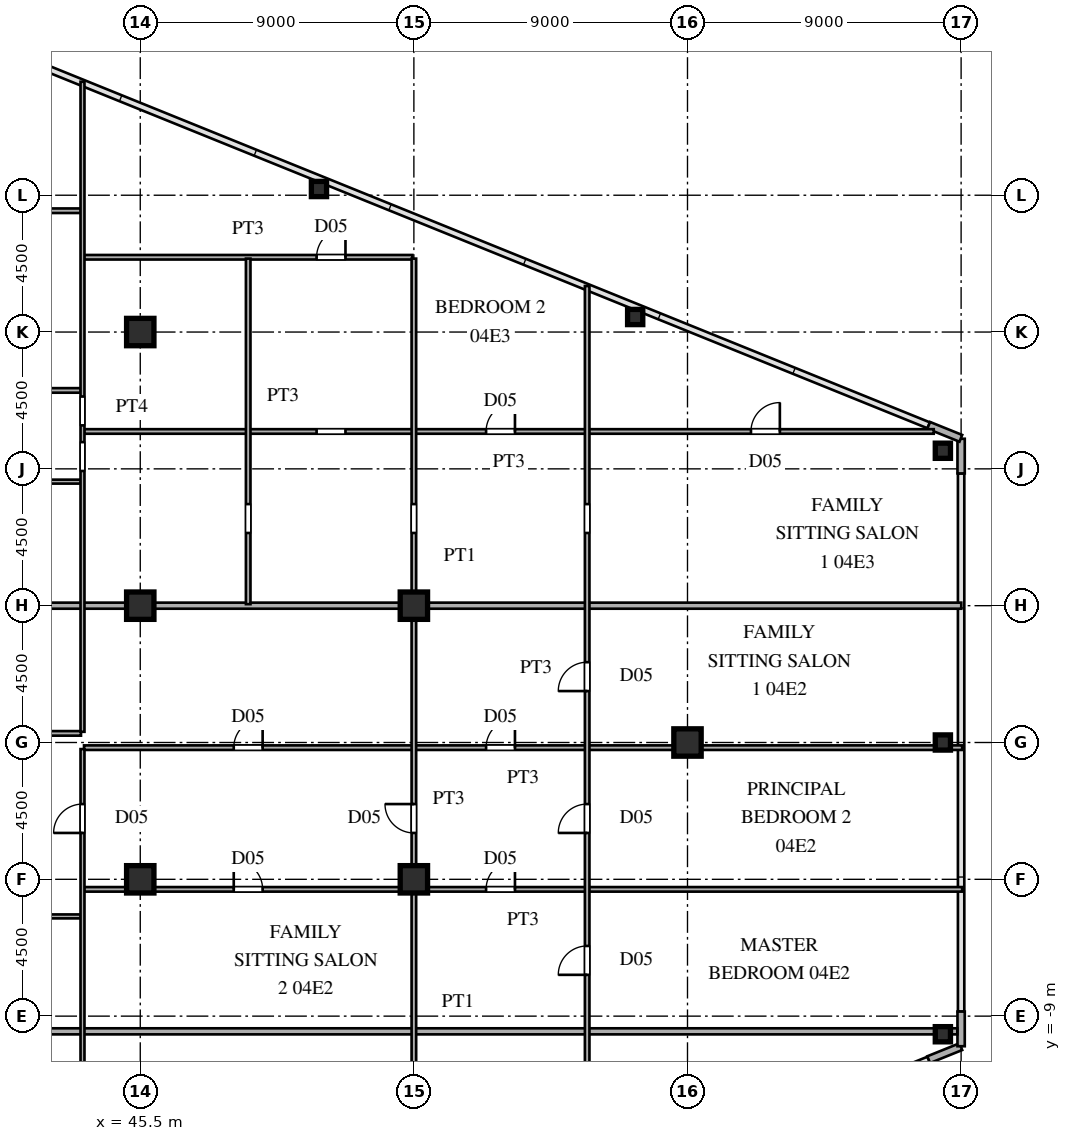
"""IFC4 building model, lengths in metres.
Left out: names, types, materials, properties, quantities, classifications, styles, units other than length and angle.
Written with IfcOpenShell. Run it as: python <this file> out.ifc"""

import sys

from ifc_helpers import new_model, si_unit, direction, frame, frame_2d, origin, origin_2d, place, context, subcontext, project, spatial, rectangle, hollow_rectangle, i_section, extrude, source, transform, mapped, element, fill, save


model = new_model("IFC4")
c1 = context("Model", 3, precision=1e-05, world=origin(), true_north=direction((0.0, 1.0)))
c2 = subcontext(c1, "Body", "Model", "MODEL_VIEW")
j1 = project(units=[si_unit("LENGTHUNIT", "METRE"), si_unit("PLANEANGLEUNIT", "RADIAN")], contexts=[c1])
p1 = place(None, origin())
s1 = spatial("IfcSite", under=j1, at=p1, CompositionType="ELEMENT")
p2 = place(p1, origin())
s2 = spatial("IfcBuilding", under=s1, at=p2, CompositionType="ELEMENT")
p3 = place(p2, frame((0.0, 0.0, 18.9)))
s3 = spatial("IfcBuildingStorey", under=s2, at=p3, CompositionType="ELEMENT", Elevation=18.9)
m1 = source(origin(), c2, "Body", "SweptSolid", [
    extrude(i_section(OverallWidth=0.9, OverallDepth=0.9, WebThickness=0.036, FlangeThickness=0.055, at=origin_2d()), origin(), (0.0, 0.0, 1.0), 3.6),
])
for number, where, z_axis, x_axis in (
    (1, (45.5, -4.5, 0.0), (0.0, 0.0, 1.0), (1.0, 0.0, 0.0)),
    (2, (45.5, 4.5, 0.0), (0.0, 0.0, 1.0), (1.0, 0.0, 0.0)),
    (3, (45.5, 13.5, 0.0), (0.0, 0.0, 1.0), (1.0, 0.0, 0.0)),
    (4, (54.5, -4.5, 0.0), (0.0, 0.0, 1.0), (1.0, 0.0, 0.0)),
    (5, (54.5, 4.5, 0.0), (0.0, 0.0, 1.0), (1.0, 0.0, 0.0)),
    (6, (63.5, 0.0, 0.0), (0.0, 0.0, 1.0), (1.0, 0.0, 0.0)),
):
    element("IfcColumn", number, at=place(p3, frame(where, z_axis=z_axis, x_axis=x_axis)), inside=s3, PredefinedType="COLUMN", context=c2, shape_type="MappedRepresentation", body=[
        mapped(m1, transform((0.0, 0.0, 0.0), scale=1.0)),
    ])
m2 = source(origin(), c2, "Body", "SweptSolid", [
    extrude(hollow_rectangle(XDim=0.5, YDim=0.5, WallThickness=0.02, at=origin_2d()), origin(), (0.0, 0.0, 1.0), 3.6),
])
for number, where, z_axis, x_axis in (
    (7, (71.9, -9.596, 0.0), (0.0, 0.0, 1.0), (1.0, 0.0, 0.0)),
    (8, (71.9, 9.596, 0.0), (0.0, 0.0, 1.0), (1.0, 0.0, 0.0)),
    (9, (51.378, 18.204, 0.0), (0.0, 0.0, 1.0), (1.0, 0.0, 0.0)),
    (10, (61.779, 13.994, 0.0), (0.0, 0.0, 1.0), (1.0, 0.0, 0.0)),
    (11, (71.9, 0.0, 0.0), (0.0, 0.0, 1.0), (1.0, 0.0, 0.0)),
):
    element("IfcColumn", number, at=place(p3, frame(where, z_axis=z_axis, x_axis=x_axis)), inside=s3, PredefinedType="COLUMN", context=c2, shape_type="MappedRepresentation", body=[
        mapped(m2, transform((0.0, 0.0, 0.0), scale=1.0)),
    ])
for number, where, z_axis, x_axis in (
    (12, (71.434, -10.431, 0.0), (0.0, 0.0, 1.0), (0.927, 0.375, 0.0)),
    (13, (72.5, -9.99, 0.0), (0.0, 0.0, 1.0), (0.0, 1.0, 0.0)),
    (14, (72.5, 8.85, 0.0), (0.0, 0.0, 1.0), (0.0, 1.0, 0.0)),
    (15, (72.491, 10.004, 0.0), (0.0, 0.0, 1.0), (-0.927, 0.375, 0.0)),
):
    element("IfcWall", number, at=place(p3, frame(where, z_axis=z_axis, x_axis=x_axis)), inside=s3, PredefinedType="SOLIDWALL", context=c2, shape_type="SweptSolid", body=[
        extrude(rectangle(XDim=1.14, YDim=0.24, at=frame_2d((0.57, 0.0))), origin(), (0.0, 0.0, 1.0), 3.38),
    ])
p4 = place(p3, frame((39.53, -9.5, 0.0), z_axis=(0.0, 0.0, 1.0), x_axis=(1.0, 0.0, 0.0)))
e16 = element("IfcWall", 16, at=p4, inside=s3, PredefinedType="PARTITIONING", context=c2, shape_type="SweptSolid", body=[
    extrude(rectangle(XDim=32.845, YDim=0.2, at=frame_2d((16.422, 0.0))), origin(), (0.0, 0.0, 1.0), 3.38),
])
p5 = place(p3, frame((39.5, -5.72, 0.0), z_axis=(0.0, 0.0, 1.0), x_axis=(1.0, 0.0, 0.0)))
e17 = element("IfcWall", 17, at=p5, inside=s3, PredefinedType="PARTITIONING", context=c2, shape_type="SweptSolid", body=[
    extrude(rectangle(XDim=4.05, YDim=0.13, at=frame_2d((2.025, 0.0))), origin(), (0.0, 0.0, 1.0), 3.38),
])
p6 = place(p5, frame((1.585, 0.0, 0.0)))
e18 = element("IfcOpeningElement", 18, at=p6, cuts=e17, PredefinedType="OPENING", context=c2, shape_type="SweptSolid", body=[
    extrude(rectangle(XDim=0.88, YDim=2.1, at=frame_2d((0.44, 1.05))), frame((0.0, 0.075, 0.0), z_axis=(0.0, -1.0, 0.0), x_axis=(1.0, 0.0, 0.0)), (0.0, 0.0, 1.0), 0.15),
])
p7 = place(p3, frame((43.65, -4.83, 0.0), z_axis=(0.0, 0.0, 1.0), x_axis=(1.0, 0.0, 0.0)))
e19 = element("IfcWall", 19, at=p7, inside=s3, PredefinedType="PARTITIONING", context=c2, shape_type="SweptSolid", body=[
    extrude(rectangle(XDim=28.885, YDim=0.15, at=frame_2d((14.442, 0.0))), origin(), (0.0, 0.0, 1.0), 3.38),
])
p8 = place(p7, frame((4.925, 0.0, 0.0)))
e20 = element("IfcOpeningElement", 20, at=p8, cuts=e19, PredefinedType="OPENING", context=c2, shape_type="SweptSolid", body=[
    extrude(rectangle(XDim=0.95, YDim=2.15, at=frame_2d((0.475, 1.075))), frame((0.0, 0.085, 0.0), z_axis=(0.0, -1.0, 0.0), x_axis=(1.0, 0.0, 0.0)), (0.0, 0.0, 1.0), 0.17),
])
p9 = place(p7, frame((13.225, 0.0, 0.0)))
e21 = element("IfcOpeningElement", 21, at=p9, cuts=e19, PredefinedType="OPENING", context=c2, shape_type="SweptSolid", body=[
    extrude(rectangle(XDim=0.95, YDim=2.15, at=frame_2d((0.475, 1.075))), frame((0.0, 0.085, 0.0), z_axis=(0.0, -1.0, 0.0), x_axis=(1.0, 0.0, 0.0)), (0.0, 0.0, 1.0), 0.17),
])
p10 = place(p3, frame((43.65, -0.17, 0.0), z_axis=(0.0, 0.0, 1.0), x_axis=(1.0, 0.0, 0.0)))
e22 = element("IfcWall", 22, at=p10, inside=s3, PredefinedType="PARTITIONING", context=c2, shape_type="SweptSolid", body=[
    extrude(rectangle(XDim=28.885, YDim=0.15, at=frame_2d((14.442, 0.0))), origin(), (0.0, 0.0, 1.0), 3.38),
])
p11 = place(p10, frame((4.925, 0.0, 0.0)))
e23 = element("IfcOpeningElement", 23, at=p11, cuts=e22, PredefinedType="OPENING", context=c2, shape_type="SweptSolid", body=[
    extrude(rectangle(XDim=0.95, YDim=2.15, at=frame_2d((0.475, 1.075))), frame((0.0, 0.085, 0.0), z_axis=(0.0, -1.0, 0.0), x_axis=(1.0, 0.0, 0.0)), (0.0, 0.0, 1.0), 0.17),
])
p12 = place(p10, frame((13.225, 0.0, 0.0)))
e24 = element("IfcOpeningElement", 24, at=p12, cuts=e22, PredefinedType="OPENING", context=c2, shape_type="SweptSolid", body=[
    extrude(rectangle(XDim=0.95, YDim=2.15, at=frame_2d((0.475, 1.075))), frame((0.0, 0.085, 0.0), z_axis=(0.0, -1.0, 0.0), x_axis=(1.0, 0.0, 0.0)), (0.0, 0.0, 1.0), 0.17),
])
p13 = place(p3, frame((39.5, 0.3, 0.0), z_axis=(0.0, 0.0, 1.0), x_axis=(1.0, 0.0, 0.0)))
e25 = element("IfcWall", 25, at=p13, inside=s3, PredefinedType="PARTITIONING", context=c2, shape_type="SweptSolid", body=[
    extrude(rectangle(XDim=4.05, YDim=0.15, at=frame_2d((2.025, 0.0))), origin(), (0.0, 0.0, 1.0), 3.38),
])
p14 = place(p13, frame((1.55, 0.0, 0.0)))
e26 = element("IfcOpeningElement", 26, at=p14, cuts=e25, PredefinedType="OPENING", context=c2, shape_type="SweptSolid", body=[
    extrude(rectangle(XDim=0.95, YDim=2.15, at=frame_2d((0.475, 1.075))), frame((0.0, 0.085, 0.0), z_axis=(0.0, -1.0, 0.0), x_axis=(1.0, 0.0, 0.0)), (0.0, 0.0, 1.0), 0.17),
])
p15 = place(p3, frame((39.53, 4.5, 0.0), z_axis=(0.0, 0.0, 1.0), x_axis=(1.0, 0.0, 0.0)))
e27 = element("IfcWall", 27, at=p15, inside=s3, PredefinedType="PARTITIONING", context=c2, shape_type="SweptSolid", body=[
    extrude(rectangle(XDim=14.99, YDim=0.2, at=frame_2d((7.495, 0.0))), origin(), (0.0, 0.0, 1.0), 2.68),
])
p16 = place(p3, frame((54.52, 4.5, 0.0), z_axis=(0.0, 0.0, 1.0), x_axis=(1.0, 0.0, 0.0)))
e28 = element("IfcWall", 28, at=p16, inside=s3, PredefinedType="PARTITIONING", context=c2, shape_type="SweptSolid", body=[
    extrude(rectangle(XDim=17.985, YDim=0.2, at=frame_2d((8.992, 0.0))), origin(), (0.0, 0.0, 1.0), 3.38),
])
p17 = place(p3, frame((39.5, 8.58, 0.0), z_axis=(0.0, 0.0, 1.0), x_axis=(1.0, 0.0, 0.0)))
e29 = element("IfcWall", 29, at=p17, inside=s3, PredefinedType="PARTITIONING", context=c2, shape_type="SweptSolid", body=[
    extrude(rectangle(XDim=4.05, YDim=0.13, at=frame_2d((2.025, 0.0))), origin(), (0.0, 0.0, 1.0), 3.38),
])
p18 = place(p17, frame((1.585, 0.0, 0.0)))
e30 = element("IfcOpeningElement", 30, at=p18, cuts=e29, PredefinedType="OPENING", context=c2, shape_type="SweptSolid", body=[
    extrude(rectangle(XDim=0.88, YDim=2.1, at=frame_2d((0.44, 1.05))), frame((0.0, 0.075, 0.0), z_axis=(0.0, -1.0, 0.0), x_axis=(1.0, 0.0, 0.0)), (0.0, 0.0, 1.0), 0.15),
])
p19 = place(p3, frame((43.65, 10.23, 0.0), z_axis=(0.0, 0.0, 1.0), x_axis=(1.0, 0.0, 0.0)))
e31 = element("IfcWall", 31, at=p19, inside=s3, PredefinedType="PARTITIONING", context=c2, shape_type="SweptSolid", body=[
    extrude(rectangle(XDim=27.949, YDim=0.15, at=frame_2d((13.974, 0.0))), origin(), (0.0, 0.0, 1.0), 3.38),
])
p20 = place(p19, frame((21.938, 0.0, 0.0)))
e32 = element("IfcOpeningElement", 32, at=p20, cuts=e31, PredefinedType="OPENING", context=c2, shape_type="SweptSolid", body=[
    extrude(rectangle(XDim=0.95, YDim=2.15, at=frame_2d((0.475, 1.075))), frame((0.0, 0.085, 0.0), z_axis=(0.0, -1.0, 0.0), x_axis=(1.0, 0.0, 0.0)), (0.0, 0.0, 1.0), 0.17),
])
p21 = place(p19, frame((13.225, 0.0, 0.0)))
e33 = element("IfcOpeningElement", 33, at=p21, cuts=e31, PredefinedType="OPENING", context=c2, shape_type="SweptSolid", body=[
    extrude(rectangle(XDim=0.95, YDim=2.15, at=frame_2d((0.475, 1.075))), frame((0.0, 0.085, 0.0), z_axis=(0.0, -1.0, 0.0), x_axis=(1.0, 0.0, 0.0)), (0.0, 0.0, 1.0), 0.17),
])
p22 = place(p19, frame((7.65, 0.0, 0.0)))
e34 = element("IfcOpeningElement", 34, at=p22, cuts=e31, PredefinedType="OPENING", context=c2, shape_type="SweptSolid", body=[
    extrude(rectangle(XDim=0.95, YDim=2.15, at=frame_2d((0.475, 1.075))), frame((0.0, 0.085, 0.0), z_axis=(0.0, -1.0, 0.0), x_axis=(1.0, 0.0, 0.0)), (0.0, 0.0, 1.0), 0.17),
])
p23 = place(p3, frame((39.5, 11.58, 0.0), z_axis=(0.0, 0.0, 1.0), x_axis=(1.0, 0.0, 0.0)))
e35 = element("IfcWall", 35, at=p23, inside=s3, PredefinedType="PARTITIONING", context=c2, shape_type="SweptSolid", body=[
    extrude(rectangle(XDim=4.05, YDim=0.15, at=frame_2d((2.025, 0.0))), origin(), (0.0, 0.0, 1.0), 3.38),
])
p24 = place(p23, frame((1.55, 0.0, 0.0)))
e36 = element("IfcOpeningElement", 36, at=p24, cuts=e35, PredefinedType="OPENING", context=c2, shape_type="SweptSolid", body=[
    extrude(rectangle(XDim=0.95, YDim=2.15, at=frame_2d((0.475, 1.075))), frame((0.0, 0.085, 0.0), z_axis=(0.0, -1.0, 0.0), x_axis=(1.0, 0.0, 0.0)), (0.0, 0.0, 1.0), 0.17),
])
p25 = place(p3, frame((43.65, 15.96, 0.0), z_axis=(0.0, 0.0, 1.0), x_axis=(1.0, 0.0, 0.0)))
e37 = element("IfcWall", 37, at=p25, inside=s3, PredefinedType="PARTITIONING", context=c2, shape_type="SweptSolid", body=[
    extrude(rectangle(XDim=10.8, YDim=0.15, at=frame_2d((5.4, 0.0))), origin(), (0.0, 0.0, 1.0), 3.38),
])
p26 = place(p25, frame((7.65, 0.0, 0.0)))
e38 = element("IfcOpeningElement", 38, at=p26, cuts=e37, PredefinedType="OPENING", context=c2, shape_type="SweptSolid", body=[
    extrude(rectangle(XDim=0.95, YDim=2.15, at=frame_2d((0.475, 1.075))), frame((0.0, 0.085, 0.0), z_axis=(0.0, -1.0, 0.0), x_axis=(1.0, 0.0, 0.0)), (0.0, 0.0, 1.0), 0.17),
])
p27 = place(p3, frame((39.45, 17.49, 0.0), z_axis=(0.0, 0.0, 1.0), x_axis=(1.0, 0.0, 0.0)))
e39 = element("IfcWall", 39, at=p27, inside=s3, PredefinedType="PARTITIONING", context=c2, shape_type="SweptSolid", body=[
    extrude(rectangle(XDim=4.1, YDim=0.15, at=frame_2d((2.05, 0.0))), origin(), (0.0, 0.0, 1.0), 3.38),
])
p28 = place(p3, frame((43.6, -21.733, 0.0), z_axis=(0.0, 0.0, 1.0), x_axis=(0.0, 1.0, 0.0)))
e40 = element("IfcWall", 40, at=p28, inside=s3, PredefinedType="PARTITIONING", context=c2, shape_type="SweptSolid", body=[
    extrude(rectangle(XDim=21.516, YDim=0.13, at=frame_2d((10.758, 0.0))), origin(), (0.0, 0.0, 1.0), 3.38),
])
p29 = place(p28, frame((6.903, 0.0, 0.0)))
e41 = element("IfcOpeningElement", 41, at=p29, cuts=e40, PredefinedType="OPENING", context=c2, shape_type="SweptSolid", body=[
    extrude(rectangle(XDim=0.95, YDim=2.15, at=frame_2d((0.475, 1.075))), frame((0.0, 0.075, 0.0), z_axis=(0.0, -1.0, 0.0), x_axis=(1.0, 0.0, 0.0)), (0.0, 0.0, 1.0), 0.15),
])
p30 = place(p28, frame((8.403, 0.0, 0.0)))
e42 = element("IfcOpeningElement", 42, at=p30, cuts=e40, PredefinedType="OPENING", context=c2, shape_type="SweptSolid", body=[
    extrude(rectangle(XDim=0.95, YDim=2.15, at=frame_2d((0.475, 1.075))), frame((0.0, 0.075, 0.0), z_axis=(0.0, -1.0, 0.0), x_axis=(1.0, 0.0, 0.0)), (0.0, 0.0, 1.0), 0.15),
])
p31 = place(p28, frame((18.758, 0.0, 0.0)))
e43 = element("IfcOpeningElement", 43, at=p31, cuts=e40, PredefinedType="OPENING", context=c2, shape_type="SweptSolid", body=[
    extrude(rectangle(XDim=0.95, YDim=2.15, at=frame_2d((0.475, 1.075))), frame((0.0, 0.075, 0.0), z_axis=(0.0, -1.0, 0.0), x_axis=(1.0, 0.0, 0.0)), (0.0, 0.0, 1.0), 0.15),
])
p32 = place(p3, frame((43.6, 0.352, 0.0), z_axis=(0.0, 0.0, 1.0), x_axis=(0.0, 1.0, 0.0)))
e44 = element("IfcWall", 44, at=p32, inside=s3, PredefinedType="PARTITIONING", context=c2, shape_type="SweptSolid", body=[
    extrude(rectangle(XDim=21.381, YDim=0.13, at=frame_2d((10.69, 0.0))), origin(), (0.0, 0.0, 1.0), 3.38),
])
p33 = place(p32, frame((8.578, 0.0, 0.0)))
e45 = element("IfcOpeningElement", 45, at=p33, cuts=e44, PredefinedType="OPENING", context=c2, shape_type="SweptSolid", body=[
    extrude(rectangle(XDim=0.95, YDim=2.15, at=frame_2d((0.475, 1.075))), frame((0.0, 0.075, 0.0), z_axis=(0.0, -1.0, 0.0), x_axis=(1.0, 0.0, 0.0)), (0.0, 0.0, 1.0), 0.15),
])
p34 = place(p32, frame((10.078, 0.0, 0.0)))
e46 = element("IfcOpeningElement", 46, at=p34, cuts=e44, PredefinedType="OPENING", context=c2, shape_type="SweptSolid", body=[
    extrude(rectangle(XDim=0.95, YDim=2.15, at=frame_2d((0.475, 1.075))), frame((0.0, 0.075, 0.0), z_axis=(0.0, -1.0, 0.0), x_axis=(1.0, 0.0, 0.0)), (0.0, 0.0, 1.0), 0.15),
])
p35 = place(p3, frame((49.05, 4.55, 0.0), z_axis=(0.0, 0.0, 1.0), x_axis=(0.0, 1.0, 0.0)))
e47 = element("IfcWall", 47, at=p35, inside=s3, PredefinedType="PARTITIONING", context=c2, shape_type="SweptSolid", body=[
    extrude(rectangle(XDim=11.365, YDim=0.15, at=frame_2d((5.683, 0.0))), origin(), (0.0, 0.0, 1.0), 3.38),
])
p36 = place(p35, frame((2.341, 0.0, 0.0)))
e48 = element("IfcOpeningElement", 48, at=p36, cuts=e47, PredefinedType="OPENING", context=c2, shape_type="SweptSolid", body=[
    extrude(rectangle(XDim=0.95, YDim=2.15, at=frame_2d((0.475, 1.075))), frame((0.0, 0.085, 0.0), z_axis=(0.0, -1.0, 0.0), x_axis=(1.0, 0.0, 0.0)), (0.0, 0.0, 1.0), 0.17),
])
p37 = place(p3, frame((54.5, -17.321, 0.0), z_axis=(0.0, 0.0, 1.0), x_axis=(0.0, 1.0, 0.0)))
e49 = element("IfcWall", 49, at=p37, inside=s3, PredefinedType="PARTITIONING", context=c2, shape_type="SweptSolid", body=[
    extrude(rectangle(XDim=33.236, YDim=0.15, at=frame_2d((16.618, 0.0))), origin(), (0.0, 0.0, 1.0), 2.68),
])
p38 = place(p37, frame((1.42, 0.0, 0.0)))
e50 = element("IfcOpeningElement", 50, at=p38, cuts=e49, PredefinedType="OPENING", context=c2, shape_type="SweptSolid", body=[
    extrude(rectangle(XDim=0.95, YDim=2.15, at=frame_2d((0.475, 1.075))), frame((0.0, 0.085, 0.0), z_axis=(0.0, -1.0, 0.0), x_axis=(1.0, 0.0, 0.0)), (0.0, 0.0, 1.0), 0.17),
])
p39 = place(p37, frame((5.313, 0.0, 0.0)))
e51 = element("IfcOpeningElement", 51, at=p39, cuts=e49, PredefinedType="OPENING", context=c2, shape_type="SweptSolid", body=[
    extrude(rectangle(XDim=0.95, YDim=2.15, at=frame_2d((0.475, 1.075))), frame((0.0, 0.085, 0.0), z_axis=(0.0, -1.0, 0.0), x_axis=(1.0, 0.0, 0.0)), (0.0, 0.0, 1.0), 0.17),
])
p40 = place(p37, frame((14.346, 0.0, 0.0)))
e52 = element("IfcOpeningElement", 52, at=p40, cuts=e49, PredefinedType="OPENING", context=c2, shape_type="SweptSolid", body=[
    extrude(rectangle(XDim=0.95, YDim=2.15, at=frame_2d((0.475, 1.075))), frame((0.0, 0.085, 0.0), z_axis=(0.0, -1.0, 0.0), x_axis=(1.0, 0.0, 0.0)), (0.0, 0.0, 1.0), 0.17),
])
p41 = place(p37, frame((24.212, 0.0, 0.0)))
e53 = element("IfcOpeningElement", 53, at=p41, cuts=e49, PredefinedType="OPENING", context=c2, shape_type="SweptSolid", body=[
    extrude(rectangle(XDim=0.95, YDim=2.15, at=frame_2d((0.475, 1.075))), frame((0.0, 0.085, 0.0), z_axis=(0.0, -1.0, 0.0), x_axis=(1.0, 0.0, 0.0)), (0.0, 0.0, 1.0), 0.17),
])
p42 = place(p3, frame((60.2, -13.516, 0.0), z_axis=(0.0, 0.0, 1.0), x_axis=(0.0, 1.0, 0.0)))
e54 = element("IfcWall", 54, at=p42, inside=s3, PredefinedType="PARTITIONING", context=c2, shape_type="SweptSolid", body=[
    extrude(rectangle(XDim=28.53, YDim=0.15, at=frame_2d((14.265, 0.0))), origin(), (0.0, 0.0, 1.0), 3.38),
])
p43 = place(p42, frame((1.508, 0.0, 0.0)))
e55 = element("IfcOpeningElement", 55, at=p43, cuts=e54, PredefinedType="OPENING", context=c2, shape_type="SweptSolid", body=[
    extrude(rectangle(XDim=0.95, YDim=2.15, at=frame_2d((0.475, 1.075))), frame((0.0, 0.085, 0.0), z_axis=(0.0, -1.0, 0.0), x_axis=(1.0, 0.0, 0.0)), (0.0, 0.0, 1.0), 0.17),
])
p44 = place(p42, frame((5.875, 0.0, 0.0)))
e56 = element("IfcOpeningElement", 56, at=p44, cuts=e54, PredefinedType="OPENING", context=c2, shape_type="SweptSolid", body=[
    extrude(rectangle(XDim=0.95, YDim=2.15, at=frame_2d((0.475, 1.075))), frame((0.0, 0.085, 0.0), z_axis=(0.0, -1.0, 0.0), x_axis=(1.0, 0.0, 0.0)), (0.0, 0.0, 1.0), 0.17),
])
p45 = place(p42, frame((10.541, 0.0, 0.0)))
e57 = element("IfcOpeningElement", 57, at=p45, cuts=e54, PredefinedType="OPENING", context=c2, shape_type="SweptSolid", body=[
    extrude(rectangle(XDim=0.95, YDim=2.15, at=frame_2d((0.475, 1.075))), frame((0.0, 0.085, 0.0), z_axis=(0.0, -1.0, 0.0), x_axis=(1.0, 0.0, 0.0)), (0.0, 0.0, 1.0), 0.17),
])
p46 = place(p42, frame((15.208, 0.0, 0.0)))
e58 = element("IfcOpeningElement", 58, at=p46, cuts=e54, PredefinedType="OPENING", context=c2, shape_type="SweptSolid", body=[
    extrude(rectangle(XDim=0.95, YDim=2.15, at=frame_2d((0.475, 1.075))), frame((0.0, 0.085, 0.0), z_axis=(0.0, -1.0, 0.0), x_axis=(1.0, 0.0, 0.0)), (0.0, 0.0, 1.0), 0.17),
])
p47 = place(p42, frame((20.407, 0.0, 0.0)))
e59 = element("IfcOpeningElement", 59, at=p47, cuts=e54, PredefinedType="OPENING", context=c2, shape_type="SweptSolid", body=[
    extrude(rectangle(XDim=0.95, YDim=2.15, at=frame_2d((0.475, 1.075))), frame((0.0, 0.085, 0.0), z_axis=(0.0, -1.0, 0.0), x_axis=(1.0, 0.0, 0.0)), (0.0, 0.0, 1.0), 0.17),
])
m3 = source(origin(), c2, "Body", "SweptSolid", [
    extrude(rectangle(XDim=0.95, YDim=2.15, at=frame_2d((0.475, 1.075))), frame((0.0, 0.025, 0.0), z_axis=(0.0, -1.0, 0.0), x_axis=(1.0, 0.0, 0.0)), (0.0, 0.0, 1.0), 0.05),
])
p48 = place(p8, origin())
e60 = element("IfcDoor", 60, at=p48, inside=s3, OperationType="SINGLE_SWING_LEFT", PredefinedType="DOOR", context=c2, shape_type="MappedRepresentation", body=[
    mapped(m3, transform((0.0, 0.0, 0.0), scale=1.0)),
])
fill(e20, e60)
p49 = place(p9, origin())
e61 = element("IfcDoor", 61, at=p49, inside=s3, OperationType="SINGLE_SWING_RIGHT", PredefinedType="DOOR", context=c2, shape_type="MappedRepresentation", body=[
    mapped(m3, transform((0.0, 0.0, 0.0), scale=1.0)),
])
fill(e21, e61)
p50 = place(p11, origin())
e62 = element("IfcDoor", 62, at=p50, inside=s3, OperationType="SINGLE_SWING_RIGHT", PredefinedType="DOOR", context=c2, shape_type="MappedRepresentation", body=[
    mapped(m3, transform((0.0, 0.0, 0.0), scale=1.0)),
])
fill(e23, e62)
p51 = place(p12, origin())
e63 = element("IfcDoor", 63, at=p51, inside=s3, OperationType="SINGLE_SWING_RIGHT", PredefinedType="DOOR", context=c2, shape_type="MappedRepresentation", body=[
    mapped(m3, transform((0.0, 0.0, 0.0), scale=1.0)),
])
fill(e24, e63)
p52 = place(p20, origin())
e64 = element("IfcDoor", 64, at=p52, inside=s3, OperationType="SINGLE_SWING_RIGHT", PredefinedType="DOOR", context=c2, shape_type="MappedRepresentation", body=[
    mapped(m3, transform((0.0, 0.0, 0.0), scale=1.0)),
])
fill(e32, e64)
p53 = place(p21, origin())
e65 = element("IfcDoor", 65, at=p53, inside=s3, OperationType="SINGLE_SWING_RIGHT", PredefinedType="DOOR", context=c2, shape_type="MappedRepresentation", body=[
    mapped(m3, transform((0.0, 0.0, 0.0), scale=1.0)),
])
fill(e33, e65)
p54 = place(p26, origin())
e66 = element("IfcDoor", 66, at=p54, inside=s3, OperationType="SINGLE_SWING_RIGHT", PredefinedType="DOOR", context=c2, shape_type="MappedRepresentation", body=[
    mapped(m3, transform((0.0, 0.0, 0.0), scale=1.0)),
])
fill(e38, e66)
p55 = place(p31, origin())
e67 = element("IfcDoor", 67, at=p55, inside=s3, OperationType="SINGLE_SWING_LEFT", PredefinedType="DOOR", context=c2, shape_type="MappedRepresentation", body=[
    mapped(m3, transform((0.0, 0.0, 0.0), scale=1.0)),
])
fill(e43, e67)
p56 = place(p40, origin())
e68 = element("IfcDoor", 68, at=p56, inside=s3, OperationType="SINGLE_SWING_RIGHT", PredefinedType="DOOR", context=c2, shape_type="MappedRepresentation", body=[
    mapped(m3, transform((0.0, 0.0, 0.0), scale=1.0)),
])
fill(e52, e68)
p57 = place(p44, origin())
e69 = element("IfcDoor", 69, at=p57, inside=s3, OperationType="SINGLE_SWING_LEFT", PredefinedType="DOOR", context=c2, shape_type="MappedRepresentation", body=[
    mapped(m3, transform((0.0, 0.0, 0.0), scale=1.0)),
])
fill(e56, e69)
p58 = place(p45, origin())
e70 = element("IfcDoor", 70, at=p58, inside=s3, OperationType="SINGLE_SWING_LEFT", PredefinedType="DOOR", context=c2, shape_type="MappedRepresentation", body=[
    mapped(m3, transform((0.0, 0.0, 0.0), scale=1.0)),
])
fill(e57, e70)
p59 = place(p46, origin())
e71 = element("IfcDoor", 71, at=p59, inside=s3, OperationType="SINGLE_SWING_LEFT", PredefinedType="DOOR", context=c2, shape_type="MappedRepresentation", body=[
    mapped(m3, transform((0.0, 0.0, 0.0), scale=1.0)),
])
fill(e58, e71)
save(model, sys.argv[1])
